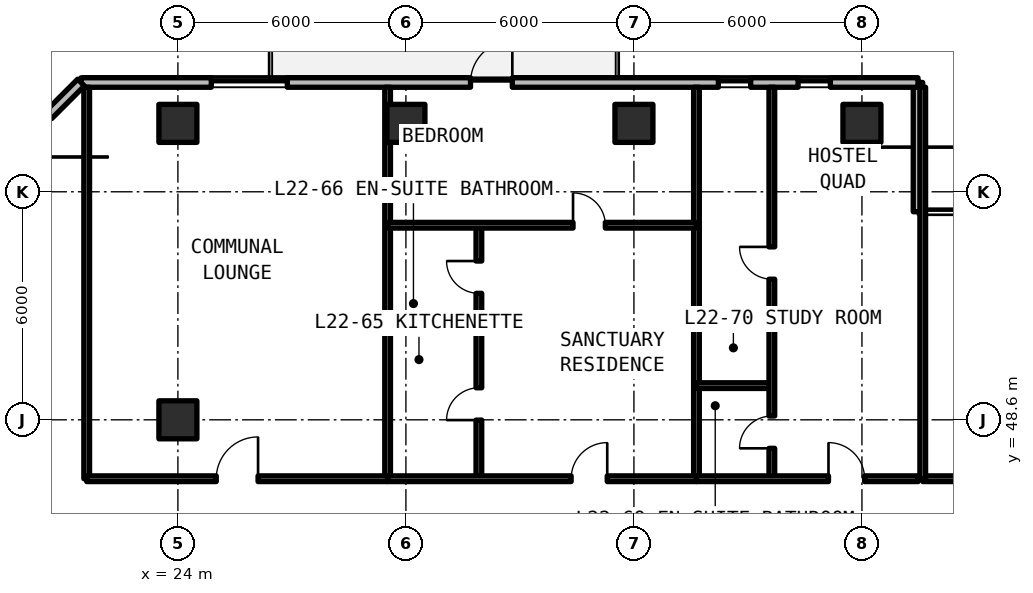
"""IFC4 building model, lengths in metres.
Left out: names, types, materials, properties, quantities, classifications, styles, units other than length and angle.
Written with IfcOpenShell. Run it as: python <this file> out.ifc"""

import sys

from ifc_helpers import new_model, si_unit, direction, frame, frame_2d, origin, origin_2d, place, context, subcontext, project, spatial, rectangle, extrude, element, fill, save


model = new_model("IFC4")
c1 = context("Model", 3, precision=1e-05, world=origin(), true_north=direction((0.0, 1.0)))
c2 = subcontext(c1, "Body", "Model", "MODEL_VIEW")
j1 = project(units=[si_unit("LENGTHUNIT", "METRE"), si_unit("PLANEANGLEUNIT", "RADIAN")], contexts=[c1])
p1 = place(None, origin())
s1 = spatial("IfcSite", under=j1, at=p1, CompositionType="ELEMENT")
p2 = place(p1, origin())
s2 = spatial("IfcBuilding", under=s1, at=p2, CompositionType="ELEMENT")
p3 = place(p2, frame((0.0, 0.0, 82.17)))
s3 = spatial("IfcBuildingStorey", under=s2, at=p3, CompositionType="ELEMENT", Elevation=82.17)
for number, where, z_axis, x_axis in (
    (1, (24.0, 48.6, 0.0), (0.0, 0.0, 1.0), (1.0, 0.0, 0.0)),
    (2, (24.0, 56.4, 0.0), (0.0, 0.0, 1.0), (1.0, 0.0, 0.0)),
    (3, (30.0, 56.4, 0.0), (0.0, 0.0, 1.0), (1.0, 0.0, 0.0)),
    (4, (36.0, 56.4, 0.0), (0.0, 0.0, 1.0), (1.0, 0.0, 0.0)),
    (5, (42.0, 56.4, 0.0), (0.0, 0.0, 1.0), (1.0, 0.0, 0.0)),
):
    element("IfcColumn", number, at=place(p3, frame(where, z_axis=z_axis, x_axis=x_axis)), inside=s3, PredefinedType="COLUMN", context=c2, shape_type="SweptSolid", body=[
        extrude(rectangle(XDim=1.0, YDim=1.0, at=origin_2d()), origin(), (0.0, 0.0, 1.0), 3.3),
    ])
p4 = place(p3, frame((43.475, 54.075, 0.0), z_axis=(0.0, 0.0, 1.0), x_axis=(0.0, 1.0, 0.0)))
e6 = element("IfcWall", 6, at=p4, inside=s3, PredefinedType="SOLIDWALL", context=c2, shape_type="SweptSolid", body=[
    extrude(rectangle(XDim=3.4, YDim=0.25, at=frame_2d((1.7, 0.0))), origin(), (0.0, 0.0, 1.0), 3.08),
])
p5 = place(p3, frame((43.475, 57.475, 0.0), z_axis=(0.0, 0.0, 1.0), x_axis=(-1.0, 0.0, 0.0)))
e7 = element("IfcWall", 7, at=p5, inside=s3, PredefinedType="SOLIDWALL", context=c2, shape_type="SweptSolid", body=[
    extrude(rectangle(XDim=22.023, YDim=0.25, at=frame_2d((11.012, 0.0))), origin(), (0.0, 0.0, 1.0), 3.08),
])
p6 = place(p5, frame((10.675, 0.0, 0.0)))
e8 = element("IfcOpeningElement", 8, at=p6, cuts=e7, PredefinedType="OPENING", context=c2, shape_type="SweptSolid", body=[
    extrude(rectangle(XDim=1.1, YDim=2.15, at=frame_2d((0.55, 1.075))), frame((0.0, 0.135, 0.0), z_axis=(0.0, -1.0, 0.0), x_axis=(1.0, 0.0, 0.0)), (0.0, 0.0, 1.0), 0.27),
])
p7 = place(p5, frame((16.596, 0.0, 0.78)))
e9 = element("IfcOpeningElement", 9, at=p7, cuts=e7, PredefinedType="OPENING", context=c2, shape_type="SweptSolid", body=[
    extrude(rectangle(XDim=2.0, YDim=1.66, at=frame_2d((1.0, 0.83))), frame((0.0, 0.135, 0.0), z_axis=(0.0, -1.0, 0.0), x_axis=(1.0, 0.0, 0.0)), (0.0, 0.0, 1.0), 0.27),
])
p8 = place(p5, frame((4.403, 0.0, 0.78)))
e10 = element("IfcOpeningElement", 10, at=p8, cuts=e7, PredefinedType="OPENING", context=c2, shape_type="SweptSolid", body=[
    extrude(rectangle(XDim=0.85, YDim=1.65, at=frame_2d((0.425, 0.825))), frame((0.0, 0.135, 0.0), z_axis=(0.0, -1.0, 0.0), x_axis=(1.0, 0.0, 0.0)), (0.0, 0.0, 1.0), 0.27),
])
p9 = place(p5, frame((2.305, 0.0, 0.78)))
e11 = element("IfcOpeningElement", 11, at=p9, cuts=e7, PredefinedType="OPENING", context=c2, shape_type="SweptSolid", body=[
    extrude(rectangle(XDim=0.85, YDim=1.65, at=frame_2d((0.425, 0.825))), frame((0.0, 0.135, 0.0), z_axis=(0.0, -1.0, 0.0), x_axis=(1.0, 0.0, 0.0)), (0.0, 0.0, 1.0), 0.27),
])
p10 = place(p3, frame((21.452, 57.475, 0.0), z_axis=(0.0, 0.0, 1.0), x_axis=(-0.707106781187, -0.707106781187, 0.0)))
e12 = element("IfcWall", 12, at=p10, inside=s3, PredefinedType="SOLIDWALL", context=c2, shape_type="SweptSolid", body=[
    extrude(rectangle(XDim=5.836, YDim=0.25, at=frame_2d((2.918, 0.0))), origin(), (0.0, 0.0, 1.0), 3.08),
])
p11 = place(p10, frame((1.218, 0.0, 0.78)))
e13 = element("IfcOpeningElement", 13, at=p11, cuts=e12, PredefinedType="OPENING", context=c2, shape_type="SweptSolid", body=[
    extrude(rectangle(XDim=3.4, YDim=1.66, at=frame_2d((1.7, 0.83))), frame((0.0, 0.135, 0.0), z_axis=(0.0, -1.0, 0.0), x_axis=(1.0, 0.0, 0.0)), (0.0, 0.0, 1.0), 0.27),
])
p12 = place(p3, frame((43.6, 47.05, 0.0), z_axis=(0.0, 0.0, 1.0), x_axis=(1.0, 0.0, 0.0)))
e14 = element("IfcWall", 14, at=p12, inside=s3, PredefinedType="SOLIDWALL", context=c2, shape_type="SweptSolid", body=[
    extrude(rectangle(XDim=8.4, YDim=0.15, at=frame_2d((4.2, 0.0))), origin(), (0.0, 0.0, 1.0), 2.35),
])
p13 = place(p12, frame((3.65, 0.0, 0.0)))
e15 = element("IfcOpeningElement", 15, at=p13, cuts=e14, PredefinedType="OPENING", context=c2, shape_type="SweptSolid", body=[
    extrude(rectangle(XDim=1.1, YDim=2.15, at=frame_2d((0.55, 1.075))), frame((0.0, 0.085, 0.0), z_axis=(0.0, -1.0, 0.0), x_axis=(1.0, 0.0, 0.0)), (0.0, 0.0, 1.0), 0.17),
])
for number, where, z_axis, x_axis in (
    (16, (43.6, 47.05, 0.0), (0.0, 0.0, 1.0), (0.0, 1.0, 0.0)),
    (17, (21.6, 47.05, 0.0), (0.0, 0.0, 1.0), (0.0, 1.0, 0.0)),
    (18, (29.519, 47.05, 0.0), (0.0, 0.0, 1.0), (0.0, 1.0, 0.0)),
):
    element("IfcWall", number, at=place(p3, frame(where, z_axis=z_axis, x_axis=x_axis)), inside=s3, PredefinedType="SOLIDWALL", context=c2, shape_type="SweptSolid", body=[
        extrude(rectangle(XDim=10.3, YDim=0.15, at=frame_2d((5.15, 0.0))), origin(), (0.0, 0.0, 1.0), 2.35),
    ])
p14 = place(p3, frame((21.6, 47.05, 0.0), z_axis=(0.0, 0.0, 1.0), x_axis=(1.0, 0.0, 0.0)))
e19 = element("IfcWall", 19, at=p14, inside=s3, PredefinedType="SOLIDWALL", context=c2, shape_type="SweptSolid", body=[
    extrude(rectangle(XDim=7.918, YDim=0.15, at=frame_2d((3.959, 0.0))), origin(), (0.0, 0.0, 1.0), 2.35),
])
p15 = place(p14, frame((3.409, 0.0, 0.0)))
e20 = element("IfcOpeningElement", 20, at=p15, cuts=e19, PredefinedType="OPENING", context=c2, shape_type="SweptSolid", body=[
    extrude(rectangle(XDim=1.1, YDim=2.15, at=frame_2d((0.55, 1.075))), frame((0.0, 0.085, 0.0), z_axis=(0.0, -1.0, 0.0), x_axis=(1.0, 0.0, 0.0)), (0.0, 0.0, 1.0), 0.17),
])
p16 = place(p3, frame((37.646, 47.05, 0.0), z_axis=(0.0, 0.0, 1.0), x_axis=(0.0, 1.0, 0.0)))
e21 = element("IfcWall", 21, at=p16, inside=s3, PredefinedType="SOLIDWALL", context=c2, shape_type="SweptSolid", body=[
    extrude(rectangle(XDim=10.3, YDim=0.15, at=frame_2d((5.15, 0.0))), origin(), (0.0, 0.0, 1.0), 2.35),
])
p17 = place(p3, frame((29.519, 50.985, 0.0), z_axis=(0.0, 0.0, 1.0), x_axis=(1.0, 0.0, 0.0)))
e22 = element("IfcWall", 22, at=p17, inside=s3, PredefinedType="PARTITIONING", context=c2, shape_type="SweptSolid", body=[
    extrude(rectangle(XDim=2.401, YDim=0.15, at=frame_2d((1.201, 0.0))), origin(), (0.0, 0.0, 1.0), 2.35),
])
p18 = place(p3, frame((31.92, 47.05, 0.0), z_axis=(0.0, 0.0, 1.0), x_axis=(0.0, 1.0, 0.0)))
e23 = element("IfcWall", 23, at=p18, inside=s3, PredefinedType="PARTITIONING", context=c2, shape_type="SweptSolid", body=[
    extrude(rectangle(XDim=6.67, YDim=0.15, at=frame_2d((3.335, 0.0))), origin(), (0.0, 0.0, 1.0), 2.35),
])
p19 = place(p18, frame((1.543, 0.0, 0.0)))
e24 = element("IfcOpeningElement", 24, at=p19, cuts=e23, PredefinedType="OPENING", context=c2, shape_type="SweptSolid", body=[
    extrude(rectangle(XDim=0.85, YDim=2.1, at=frame_2d((0.425, 1.05))), frame((0.0, 0.085, 0.0), z_axis=(0.0, -1.0, 0.0), x_axis=(1.0, 0.0, 0.0)), (0.0, 0.0, 1.0), 0.17),
])
p20 = place(p18, frame((4.878, 0.0, 0.0)))
e25 = element("IfcOpeningElement", 25, at=p20, cuts=e23, PredefinedType="OPENING", context=c2, shape_type="SweptSolid", body=[
    extrude(rectangle(XDim=0.85, YDim=2.1, at=frame_2d((0.425, 1.05))), frame((0.0, 0.085, 0.0), z_axis=(0.0, -1.0, 0.0), x_axis=(1.0, 0.0, 0.0)), (0.0, 0.0, 1.0), 0.17),
])
p21 = place(p3, frame((29.519, 53.72, 0.0), z_axis=(0.0, 0.0, 1.0), x_axis=(1.0, 0.0, 0.0)))
e26 = element("IfcWall", 26, at=p21, inside=s3, PredefinedType="PARTITIONING", context=c2, shape_type="SweptSolid", body=[
    extrude(rectangle(XDim=8.127, YDim=0.15, at=frame_2d((4.063, 0.0))), origin(), (0.0, 0.0, 1.0), 2.35),
])
p22 = place(p21, frame((4.879, 0.0, 0.0)))
e27 = element("IfcOpeningElement", 27, at=p22, cuts=e26, PredefinedType="OPENING", context=c2, shape_type="SweptSolid", body=[
    extrude(rectangle(XDim=0.85, YDim=2.1, at=frame_2d((0.425, 1.05))), frame((0.0, 0.085, 0.0), z_axis=(0.0, -1.0, 0.0), x_axis=(1.0, 0.0, 0.0)), (0.0, 0.0, 1.0), 0.17),
])
p23 = place(p3, frame((29.519, 47.05, 0.0), z_axis=(0.0, 0.0, 1.0), x_axis=(1.0, 0.0, 0.0)))
e28 = element("IfcWall", 28, at=p23, inside=s3, PredefinedType="SOLIDWALL", context=c2, shape_type="SweptSolid", body=[
    extrude(rectangle(XDim=8.127, YDim=0.15, at=frame_2d((4.063, 0.0))), origin(), (0.0, 0.0, 1.0), 2.35),
])
p24 = place(p23, frame((4.829, 0.0, 0.0)))
e29 = element("IfcOpeningElement", 29, at=p24, cuts=e28, PredefinedType="OPENING", context=c2, shape_type="SweptSolid", body=[
    extrude(rectangle(XDim=0.95, YDim=2.15, at=frame_2d((0.475, 1.075))), frame((0.0, 0.085, 0.0), z_axis=(0.0, -1.0, 0.0), x_axis=(1.0, 0.0, 0.0)), (0.0, 0.0, 1.0), 0.17),
])
p25 = place(p3, frame((37.646, 49.5, 0.0), z_axis=(0.0, 0.0, 1.0), x_axis=(1.0, 0.0, 0.0)))
e30 = element("IfcWall", 30, at=p25, inside=s3, PredefinedType="PARTITIONING", context=c2, shape_type="SweptSolid", body=[
    extrude(rectangle(XDim=1.984, YDim=0.15, at=frame_2d((0.992, 0.0))), origin(), (0.0, 0.0, 1.0), 2.35),
])
p26 = place(p3, frame((39.629, 47.05, 0.0), z_axis=(0.0, 0.0, 1.0), x_axis=(0.0, 1.0, 0.0)))
e31 = element("IfcWall", 31, at=p26, inside=s3, PredefinedType="PARTITIONING", context=c2, shape_type="SweptSolid", body=[
    extrude(rectangle(XDim=10.3, YDim=0.15, at=frame_2d((5.15, 0.0))), origin(), (0.0, 0.0, 1.0), 2.35),
])
p27 = place(p26, frame((0.8, 0.0, 0.0)))
e32 = element("IfcOpeningElement", 32, at=p27, cuts=e31, PredefinedType="OPENING", context=c2, shape_type="SweptSolid", body=[
    extrude(rectangle(XDim=0.85, YDim=2.1, at=frame_2d((0.425, 1.05))), frame((0.0, 0.085, 0.0), z_axis=(0.0, -1.0, 0.0), x_axis=(1.0, 0.0, 0.0)), (0.0, 0.0, 1.0), 0.17),
])
p28 = place(p26, frame((5.25, 0.0, 0.0)))
e33 = element("IfcOpeningElement", 33, at=p28, cuts=e31, PredefinedType="OPENING", context=c2, shape_type="SweptSolid", body=[
    extrude(rectangle(XDim=0.85, YDim=2.1, at=frame_2d((0.425, 1.05))), frame((0.0, 0.085, 0.0), z_axis=(0.0, -1.0, 0.0), x_axis=(1.0, 0.0, 0.0)), (0.0, 0.0, 1.0), 0.17),
])
p29 = place(p3, frame((37.646, 47.05, 0.0), z_axis=(0.0, 0.0, 1.0), x_axis=(1.0, 0.0, 0.0)))
e34 = element("IfcWall", 34, at=p29, inside=s3, PredefinedType="SOLIDWALL", context=c2, shape_type="SweptSolid", body=[
    extrude(rectangle(XDim=5.834, YDim=0.15, at=frame_2d((2.917, 0.0))), origin(), (0.0, 0.0, 1.0), 2.35),
])
p30 = place(p29, frame((3.474, 0.0, 0.0)))
e35 = element("IfcOpeningElement", 35, at=p30, cuts=e34, PredefinedType="OPENING", context=c2, shape_type="SweptSolid", body=[
    extrude(rectangle(XDim=0.95, YDim=2.15, at=frame_2d((0.475, 1.075))), frame((0.0, 0.085, 0.0), z_axis=(0.0, -1.0, 0.0), x_axis=(1.0, 0.0, 0.0)), (0.0, 0.0, 1.0), 0.17),
])
p31 = place(p6, frame((1.1, 0.0, 0.0), z_axis=(0.0, 0.0, 1.0), x_axis=(-1.0, 0.0, 0.0)))
e36 = element("IfcDoor", 36, at=p31, inside=s3, OperationType="SINGLE_SWING_RIGHT", PredefinedType="DOOR", context=c2, shape_type="SweptSolid", body=[
    extrude(rectangle(XDim=1.1, YDim=2.15, at=frame_2d((0.55, 1.075))), frame((0.0, 0.025, 0.0), z_axis=(0.0, -1.0, 0.0), x_axis=(1.0, 0.0, 0.0)), (0.0, 0.0, 1.0), 0.05),
])
fill(e8, e36)
p32 = place(p7, origin())
e37 = element("IfcWindow", 37, at=p32, inside=s3, PartitioningType="SINGLE_PANEL", PredefinedType="WINDOW", context=c2, shape_type="SweptSolid", body=[
    extrude(rectangle(XDim=2.0, YDim=1.66, at=frame_2d((1.0, 0.83))), frame((0.0, 0.03, 0.0), z_axis=(0.0, -1.0, 0.0), x_axis=(1.0, 0.0, 0.0)), (0.0, 0.0, 1.0), 0.06),
])
fill(e9, e37)
p33 = place(p8, origin())
e38 = element("IfcWindow", 38, at=p33, inside=s3, PartitioningType="SINGLE_PANEL", PredefinedType="WINDOW", context=c2, shape_type="SweptSolid", body=[
    extrude(rectangle(XDim=0.85, YDim=1.65, at=frame_2d((0.425, 0.825))), frame((0.0, 0.03, 0.0), z_axis=(0.0, -1.0, 0.0), x_axis=(1.0, 0.0, 0.0)), (0.0, 0.0, 1.0), 0.06),
])
fill(e10, e38)
p34 = place(p9, origin())
e39 = element("IfcWindow", 39, at=p34, inside=s3, PartitioningType="SINGLE_PANEL", PredefinedType="WINDOW", context=c2, shape_type="SweptSolid", body=[
    extrude(rectangle(XDim=0.85, YDim=1.65, at=frame_2d((0.425, 0.825))), frame((0.0, 0.03, 0.0), z_axis=(0.0, -1.0, 0.0), x_axis=(1.0, 0.0, 0.0)), (0.0, 0.0, 1.0), 0.06),
])
fill(e11, e39)
p35 = place(p15, origin())
e40 = element("IfcDoor", 40, at=p35, inside=s3, OperationType="SINGLE_SWING_RIGHT", PredefinedType="DOOR", context=c2, shape_type="SweptSolid", body=[
    extrude(rectangle(XDim=1.1, YDim=2.15, at=frame_2d((0.55, 1.075))), frame((0.0, 0.025, 0.0), z_axis=(0.0, -1.0, 0.0), x_axis=(1.0, 0.0, 0.0)), (0.0, 0.0, 1.0), 0.05),
])
fill(e20, e40)
p36 = place(p19, origin())
e41 = element("IfcDoor", 41, at=p36, inside=s3, OperationType="SINGLE_SWING_LEFT", PredefinedType="DOOR", context=c2, shape_type="SweptSolid", body=[
    extrude(rectangle(XDim=0.85, YDim=2.1, at=frame_2d((0.425, 1.05))), frame((0.0, 0.025, 0.0), z_axis=(0.0, -1.0, 0.0), x_axis=(1.0, 0.0, 0.0)), (0.0, 0.0, 1.0), 0.05),
])
fill(e24, e41)
p37 = place(p20, origin())
e42 = element("IfcDoor", 42, at=p37, inside=s3, OperationType="SINGLE_SWING_RIGHT", PredefinedType="DOOR", context=c2, shape_type="SweptSolid", body=[
    extrude(rectangle(XDim=0.85, YDim=2.1, at=frame_2d((0.425, 1.05))), frame((0.0, 0.025, 0.0), z_axis=(0.0, -1.0, 0.0), x_axis=(1.0, 0.0, 0.0)), (0.0, 0.0, 1.0), 0.05),
])
fill(e25, e42)
p38 = place(p22, origin())
e43 = element("IfcDoor", 43, at=p38, inside=s3, OperationType="SINGLE_SWING_LEFT", PredefinedType="DOOR", context=c2, shape_type="SweptSolid", body=[
    extrude(rectangle(XDim=0.85, YDim=2.1, at=frame_2d((0.425, 1.05))), frame((0.0, 0.025, 0.0), z_axis=(0.0, -1.0, 0.0), x_axis=(1.0, 0.0, 0.0)), (0.0, 0.0, 1.0), 0.05),
])
fill(e27, e43)
p39 = place(p24, origin())
e44 = element("IfcDoor", 44, at=p39, inside=s3, OperationType="SINGLE_SWING_RIGHT", PredefinedType="DOOR", context=c2, shape_type="SweptSolid", body=[
    extrude(rectangle(XDim=0.95, YDim=2.15, at=frame_2d((0.475, 1.075))), frame((0.0, 0.025, 0.0), z_axis=(0.0, -1.0, 0.0), x_axis=(1.0, 0.0, 0.0)), (0.0, 0.0, 1.0), 0.05),
])
fill(e29, e44)
p40 = place(p27, origin())
e45 = element("IfcDoor", 45, at=p40, inside=s3, OperationType="SINGLE_SWING_LEFT", PredefinedType="DOOR", context=c2, shape_type="SweptSolid", body=[
    extrude(rectangle(XDim=0.85, YDim=2.1, at=frame_2d((0.425, 1.05))), frame((0.0, 0.025, 0.0), z_axis=(0.0, -1.0, 0.0), x_axis=(1.0, 0.0, 0.0)), (0.0, 0.0, 1.0), 0.05),
])
fill(e32, e45)
p41 = place(p28, origin())
e46 = element("IfcDoor", 46, at=p41, inside=s3, OperationType="SINGLE_SWING_RIGHT", PredefinedType="DOOR", context=c2, shape_type="SweptSolid", body=[
    extrude(rectangle(XDim=0.85, YDim=2.1, at=frame_2d((0.425, 1.05))), frame((0.0, 0.025, 0.0), z_axis=(0.0, -1.0, 0.0), x_axis=(1.0, 0.0, 0.0)), (0.0, 0.0, 1.0), 0.05),
])
fill(e33, e46)
p42 = place(p30, origin())
e47 = element("IfcDoor", 47, at=p42, inside=s3, OperationType="SINGLE_SWING_LEFT", PredefinedType="DOOR", context=c2, shape_type="SweptSolid", body=[
    extrude(rectangle(XDim=0.95, YDim=2.15, at=frame_2d((0.475, 1.075))), frame((0.0, 0.025, 0.0), z_axis=(0.0, -1.0, 0.0), x_axis=(1.0, 0.0, 0.0)), (0.0, 0.0, 1.0), 0.05),
])
fill(e35, e47)
save(model, sys.argv[1])
